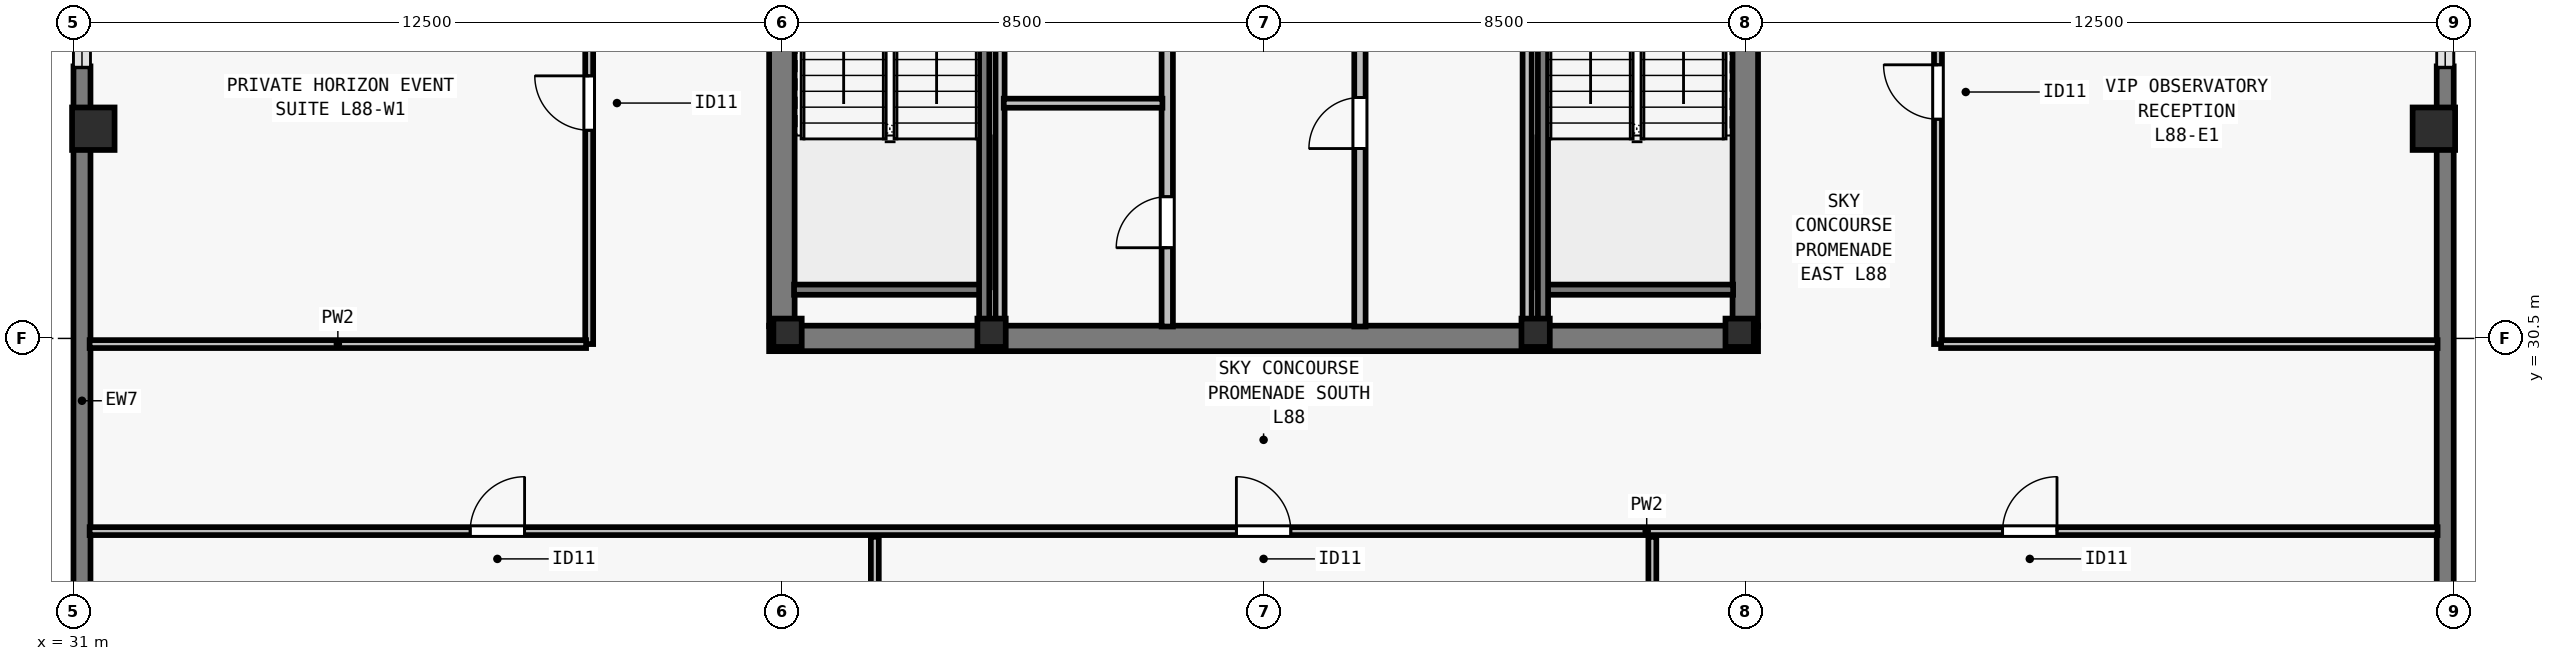
"""IFC4 building model, lengths in metres.
Left out: names, types, materials, properties, quantities, classifications, styles, units other than length and angle.
Written with IfcOpenShell. Run it as: python <this file> out.ifc"""

import sys

from ifc_helpers import new_model, si_unit, direction, frame, frame_2d, origin, origin_2d, place, context, subcontext, project, spatial, rectangle, i_section, extrude, element, fill, save


model = new_model("IFC4")
c1 = context("Model", 3, precision=1e-05, world=origin(), true_north=direction((0.0, 1.0)))
c2 = subcontext(c1, "Body", "Model", "MODEL_VIEW")
j1 = project(units=[si_unit("LENGTHUNIT", "METRE"), si_unit("PLANEANGLEUNIT", "RADIAN")], contexts=[c1])
p1 = place(None, origin())
s1 = spatial("IfcSite", under=j1, at=p1, CompositionType="ELEMENT")
p2 = place(p1, origin())
s2 = spatial("IfcBuilding", under=s1, at=p2, CompositionType="ELEMENT")
p3 = place(p2, frame((0.0, 0.0, 320.0)))
s3 = spatial("IfcBuildingStorey", under=s2, at=p3, CompositionType="ELEMENT", Elevation=320.0)
for number, where, z_axis, x_axis in (
    (1, (43.6, 30.6, 0.0), (0.0, 0.0, 1.0), (1.0, 0.0, 0.0)),
    (2, (47.2, 30.6, 0.0), (0.0, 0.0, 1.0), (1.0, 0.0, 0.0)),
    (3, (56.8, 30.6, 0.0), (0.0, 0.0, 1.0), (1.0, 0.0, 0.0)),
    (4, (60.4, 30.6, 0.0), (0.0, 0.0, 1.0), (1.0, 0.0, 0.0)),
):
    element("IfcColumn", number, at=place(p3, frame(where, z_axis=z_axis, x_axis=x_axis)), inside=s3, PredefinedType="COLUMN", context=c2, shape_type="SweptSolid", body=[
        extrude(i_section(OverallWidth=0.5, OverallDepth=0.5, WebThickness=0.028, FlangeThickness=0.045, at=origin_2d()), origin(), (0.0, 0.0, 1.0), 4.5),
    ])
for number, where, z_axis, x_axis in (
    (5, (72.65, 34.2, 0.0), (0.0, 0.0, 1.0), (0.0, 1.0, 0.0)),
    (6, (31.35, 34.2, 0.0), (0.0, 0.0, 1.0), (0.0, 1.0, 0.0)),
):
    element("IfcColumn", number, at=place(p3, frame(where, z_axis=z_axis, x_axis=x_axis)), inside=s3, PredefinedType="COLUMN", context=c2, shape_type="SweptSolid", body=[
        extrude(rectangle(XDim=0.75, YDim=0.75, at=origin_2d()), origin(), (0.0, 0.0, 1.0), 4.5),
    ])
p4 = place(p3, frame((72.85, 35.3, 0.0), z_axis=(0.0, 0.0, 1.0), x_axis=(0.0, -1.0, 0.0)))
e7 = element("IfcWall", 7, at=p4, inside=s3, PredefinedType="SOLIDWALL", context=c2, shape_type="SweptSolid", body=[
    extrude(rectangle(XDim=11.522, YDim=0.3, at=frame_2d((5.761, 0.0))), origin(), (0.0, 0.0, 1.0), 4.25),
])
p5 = place(p3, frame((31.15, 23.5, 0.0), z_axis=(0.0, 0.0, 1.0), x_axis=(0.0, 1.0, 0.0)))
e8 = element("IfcWall", 8, at=p5, inside=s3, PredefinedType="SOLIDWALL", context=c2, shape_type="SweptSolid", body=[
    extrude(rectangle(XDim=11.8, YDim=0.3, at=frame_2d((5.9, 0.0))), origin(), (0.0, 0.0, 1.0), 4.25),
])
p6 = place(p3, frame((43.275, 30.5, 0.0), z_axis=(0.0, 0.0, 1.0), x_axis=(1.0, 0.0, 0.0)))
e9 = element("IfcWall", 9, at=p6, inside=s3, PredefinedType="SHEAR", context=c2, shape_type="SweptSolid", body=[
    extrude(rectangle(XDim=17.45, YDim=0.45, at=frame_2d((8.725, 0.0))), origin(), (0.0, 0.0, 1.0), 4.25),
])
for number, where, z_axis, x_axis in (
    (10, (43.5, 30.715, 0.0), (0.0, 0.0, 1.0), (0.0, 1.0, 0.0)),
    (11, (60.5, 30.715, 0.0), (0.0, 0.0, 1.0), (0.0, 1.0, 0.0)),
):
    element("IfcWall", number, at=place(p3, frame(where, z_axis=z_axis, x_axis=x_axis)), inside=s3, PredefinedType="SHEAR", context=c2, shape_type="SweptSolid", body=[
        extrude(rectangle(XDim=8.035, YDim=0.45, at=frame_2d((4.018, 0.0))), origin(), (0.0, 0.0, 1.0), 4.25),
    ])
p7 = place(p3, frame((50.3, 30.71, 0.0), z_axis=(0.0, 0.0, 1.0), x_axis=(0.0, 1.0, 0.0)))
e12 = element("IfcWall", 12, at=p7, inside=s3, PredefinedType="SOLIDWALL", context=c2, shape_type="SweptSolid", body=[
    extrude(rectangle(XDim=7.905, YDim=0.2, at=frame_2d((3.953, 0.0))), origin(), (0.0, 0.0, 1.0), 4.25),
])
p8 = place(p7, frame((1.39, 0.0, 0.0)))
e13 = element("IfcOpeningElement", 13, at=p8, cuts=e12, PredefinedType="OPENING", context=c2, shape_type="SweptSolid", body=[
    extrude(rectangle(XDim=0.9, YDim=2.12, at=frame_2d((0.45, 1.06))), frame((0.0, 0.11, 0.0), z_axis=(0.0, -1.0, 0.0), x_axis=(1.0, 0.0, 0.0)), (0.0, 0.0, 1.0), 0.22),
])
p9 = place(p7, frame((5.39, 0.0, 0.0)))
e14 = element("IfcOpeningElement", 14, at=p9, cuts=e12, PredefinedType="OPENING", context=c2, shape_type="SweptSolid", body=[
    extrude(rectangle(XDim=0.9, YDim=2.12, at=frame_2d((0.45, 1.06))), frame((0.0, 0.11, 0.0), z_axis=(0.0, -1.0, 0.0), x_axis=(1.0, 0.0, 0.0)), (0.0, 0.0, 1.0), 0.22),
])
p10 = place(p3, frame((53.7, 30.71, 0.0), z_axis=(0.0, 0.0, 1.0), x_axis=(0.0, 1.0, 0.0)))
e15 = element("IfcWall", 15, at=p10, inside=s3, PredefinedType="SOLIDWALL", context=c2, shape_type="SweptSolid", body=[
    extrude(rectangle(XDim=7.905, YDim=0.2, at=frame_2d((3.953, 0.0))), origin(), (0.0, 0.0, 1.0), 4.25),
])
p11 = place(p10, frame((3.14, 0.0, 0.0)))
e16 = element("IfcOpeningElement", 16, at=p11, cuts=e15, PredefinedType="OPENING", context=c2, shape_type="SweptSolid", body=[
    extrude(rectangle(XDim=0.9, YDim=2.12, at=frame_2d((0.45, 1.06))), frame((0.0, 0.11, 0.0), z_axis=(0.0, -1.0, 0.0), x_axis=(1.0, 0.0, 0.0)), (0.0, 0.0, 1.0), 0.22),
])
p12 = place(p3, frame((47.35, 30.71, 0.0), z_axis=(0.0, 0.0, 1.0), x_axis=(0.0, 1.0, 0.0)))
e17 = element("IfcWall", 17, at=p12, inside=s3, PredefinedType="PARTITIONING", context=c2, shape_type="SweptSolid", body=[
    extrude(rectangle(XDim=7.905, YDim=0.16, at=frame_2d((3.953, 0.0))), origin(), (0.0, 0.0, 1.0), 4.25),
])
p13 = place(p3, frame((47.415, 34.65, 0.0), z_axis=(0.0, 0.0, 1.0), x_axis=(1.0, 0.0, 0.0)))
e18 = element("IfcWall", 18, at=p13, inside=s3, PredefinedType="PARTITIONING", context=c2, shape_type="SweptSolid", body=[
    extrude(rectangle(XDim=2.8, YDim=0.16, at=frame_2d((1.4, 0.0))), origin(), (0.0, 0.0, 1.0), 4.25),
])
p14 = place(p3, frame((56.65, 30.71, 0.0), z_axis=(0.0, 0.0, 1.0), x_axis=(0.0, 1.0, 0.0)))
e19 = element("IfcWall", 19, at=p14, inside=s3, PredefinedType="PARTITIONING", context=c2, shape_type="SweptSolid", body=[
    extrude(rectangle(XDim=7.905, YDim=0.16, at=frame_2d((3.953, 0.0))), origin(), (0.0, 0.0, 1.0), 4.25),
])
p15 = place(p3, frame((31.285, 27.1, 0.0), z_axis=(0.0, 0.0, 1.0), x_axis=(1.0, 0.0, 0.0)))
e20 = element("IfcWall", 20, at=p15, inside=s3, PredefinedType="PARTITIONING", context=c2, shape_type="SweptSolid", body=[
    extrude(rectangle(XDim=41.43, YDim=0.14, at=frame_2d((20.715, 0.0))), origin(), (0.0, 0.0, 1.0), 3.969),
])
p16 = place(p15, frame((6.715, 0.0, 0.0)))
e21 = element("IfcOpeningElement", 21, at=p16, cuts=e20, PredefinedType="OPENING", context=c2, shape_type="SweptSolid", body=[
    extrude(rectangle(XDim=0.96, YDim=2.12, at=frame_2d((0.48, 1.06))), frame((0.0, 0.08, 0.0), z_axis=(0.0, -1.0, 0.0), x_axis=(1.0, 0.0, 0.0)), (0.0, 0.0, 1.0), 0.16),
])
p17 = place(p15, frame((20.235, 0.0, 0.0)))
e22 = element("IfcOpeningElement", 22, at=p17, cuts=e20, PredefinedType="OPENING", context=c2, shape_type="SweptSolid", body=[
    extrude(rectangle(XDim=0.96, YDim=2.12, at=frame_2d((0.48, 1.06))), frame((0.0, 0.08, 0.0), z_axis=(0.0, -1.0, 0.0), x_axis=(1.0, 0.0, 0.0)), (0.0, 0.0, 1.0), 0.16),
])
p18 = place(p15, frame((33.755, 0.0, 0.0)))
e23 = element("IfcOpeningElement", 23, at=p18, cuts=e20, PredefinedType="OPENING", context=c2, shape_type="SweptSolid", body=[
    extrude(rectangle(XDim=0.96, YDim=2.12, at=frame_2d((0.48, 1.06))), frame((0.0, 0.08, 0.0), z_axis=(0.0, -1.0, 0.0), x_axis=(1.0, 0.0, 0.0)), (0.0, 0.0, 1.0), 0.16),
])
p19 = place(p3, frame((40.1, 30.4, 0.0), z_axis=(0.0, 0.0, 1.0), x_axis=(0.0, 1.0, 0.0)))
e24 = element("IfcWall", 24, at=p19, inside=s3, PredefinedType="PARTITIONING", context=c2, shape_type="SweptSolid", body=[
    extrude(rectangle(XDim=17.2, YDim=0.14, at=frame_2d((8.6, 0.0))), origin(), (0.0, 0.0, 1.0), 3.969),
])
p20 = place(p19, frame((3.772, 0.0, 0.0)))
e25 = element("IfcOpeningElement", 25, at=p20, cuts=e24, PredefinedType="OPENING", context=c2, shape_type="SweptSolid", body=[
    extrude(rectangle(XDim=0.96, YDim=2.12, at=frame_2d((0.48, 1.06))), frame((0.0, 0.08, 0.0), z_axis=(0.0, -1.0, 0.0), x_axis=(1.0, 0.0, 0.0)), (0.0, 0.0, 1.0), 0.16),
])
p21 = place(p19, frame((12.272, 0.0, 0.0)))
e26 = element("IfcOpeningElement", 26, at=p21, cuts=e24, PredefinedType="OPENING", context=c2, shape_type="SweptSolid", body=[
    extrude(rectangle(XDim=0.96, YDim=2.12, at=frame_2d((0.48, 1.06))), frame((0.0, 0.08, 0.0), z_axis=(0.0, -1.0, 0.0), x_axis=(1.0, 0.0, 0.0)), (0.0, 0.0, 1.0), 0.16),
])
p22 = place(p3, frame((63.9, 30.4, 0.0), z_axis=(0.0, 0.0, 1.0), x_axis=(0.0, 1.0, 0.0)))
e27 = element("IfcWall", 27, at=p22, inside=s3, PredefinedType="PARTITIONING", context=c2, shape_type="SweptSolid", body=[
    extrude(rectangle(XDim=17.2, YDim=0.14, at=frame_2d((8.6, 0.0))), origin(), (0.0, 0.0, 1.0), 4.25),
])
p23 = place(p22, frame((3.968, 0.0, 0.0)))
e28 = element("IfcOpeningElement", 28, at=p23, cuts=e27, PredefinedType="OPENING", context=c2, shape_type="SweptSolid", body=[
    extrude(rectangle(XDim=0.96, YDim=2.12, at=frame_2d((0.48, 1.06))), frame((0.0, 0.08, 0.0), z_axis=(0.0, -1.0, 0.0), x_axis=(1.0, 0.0, 0.0)), (0.0, 0.0, 1.0), 0.16),
])
p24 = place(p22, frame((12.468, 0.0, 0.0)))
e29 = element("IfcOpeningElement", 29, at=p24, cuts=e27, PredefinedType="OPENING", context=c2, shape_type="SweptSolid", body=[
    extrude(rectangle(XDim=0.96, YDim=2.12, at=frame_2d((0.48, 1.06))), frame((0.0, 0.08, 0.0), z_axis=(0.0, -1.0, 0.0), x_axis=(1.0, 0.0, 0.0)), (0.0, 0.0, 1.0), 0.16),
])
for number, where, z_axis, x_axis in (
    (30, (31.285, 30.4, 0.0), (0.0, 0.0, 1.0), (1.0, 0.0, 0.0)),
    (31, (63.955, 30.4, 0.0), (0.0, 0.0, 1.0), (1.0, 0.0, 0.0)),
):
    element("IfcWall", number, at=place(p3, frame(where, z_axis=z_axis, x_axis=x_axis)), inside=s3, PredefinedType="PARTITIONING", context=c2, shape_type="SweptSolid", body=[
        extrude(rectangle(XDim=8.76, YDim=0.14, at=frame_2d((4.38, 0.0))), origin(), (0.0, 0.0, 1.0), 2.425),
    ])
for number, where, z_axis, x_axis in (
    (32, (45.14, 18.285, 0.0), (0.0, 0.0, 1.0), (0.0, 1.0, 0.0)),
    (33, (58.86, 18.285, 0.0), (0.0, 0.0, 1.0), (0.0, 1.0, 0.0)),
):
    element("IfcWall", number, at=place(p3, frame(where, z_axis=z_axis, x_axis=x_axis)), inside=s3, PredefinedType="PARTITIONING", context=c2, shape_type="SweptSolid", body=[
        extrude(rectangle(XDim=8.715, YDim=0.14, at=frame_2d((4.357, 0.0))), origin(), (0.0, 0.0, 1.0), 4.25),
    ])
p25 = place(p3, frame((43.715, 31.36, 0.0), z_axis=(0.0, 0.0, 1.0), x_axis=(1.0, 0.0, 0.0)))
e34 = element("IfcWall", 34, at=p25, inside=s3, PredefinedType="SOLIDWALL", context=c2, shape_type="SweptSolid", body=[
    extrude(rectangle(XDim=3.28, YDim=0.18, at=frame_2d((1.64, 0.0))), origin(), (0.0, 0.0, 1.0), 4.25),
])
p26 = place(p3, frame((47.07, 38.78, 0.0), z_axis=(0.0, 0.0, 1.0), x_axis=(0.0, -1.0, 0.0)))
e35 = element("IfcWall", 35, at=p26, inside=s3, PredefinedType="SOLIDWALL", context=c2, shape_type="SweptSolid", body=[
    extrude(rectangle(XDim=8.067, YDim=0.18, at=frame_2d((4.034, 0.0))), origin(), (0.0, 0.0, 1.0), 4.25),
])
p27 = place(p3, frame((57.005, 31.36, 0.0), z_axis=(0.0, 0.0, 1.0), x_axis=(1.0, 0.0, 0.0)))
e36 = element("IfcWall", 36, at=p27, inside=s3, PredefinedType="SOLIDWALL", context=c2, shape_type="SweptSolid", body=[
    extrude(rectangle(XDim=3.28, YDim=0.18, at=frame_2d((1.64, 0.0))), origin(), (0.0, 0.0, 1.0), 4.25),
])
p28 = place(p3, frame((56.93, 38.78, 0.0), z_axis=(0.0, 0.0, 1.0), x_axis=(0.0, -1.0, 0.0)))
e37 = element("IfcWall", 37, at=p28, inside=s3, PredefinedType="SOLIDWALL", context=c2, shape_type="SweptSolid", body=[
    extrude(rectangle(XDim=8.067, YDim=0.18, at=frame_2d((4.034, 0.0))), origin(), (0.0, 0.0, 1.0), 4.25),
])
p29 = place(p8, origin())
e38 = element("IfcDoor", 38, at=p29, inside=s3, OperationType="SINGLE_SWING_LEFT", PredefinedType="DOOR", context=c2, shape_type="SweptSolid", body=[
    extrude(rectangle(XDim=0.9, YDim=2.12, at=frame_2d((0.45, 1.06))), frame((0.0, 0.025, 0.0), z_axis=(0.0, -1.0, 0.0), x_axis=(1.0, 0.0, 0.0)), (0.0, 0.0, 1.0), 0.05),
])
fill(e13, e38)
p30 = place(p11, origin())
e39 = element("IfcDoor", 39, at=p30, inside=s3, OperationType="SINGLE_SWING_LEFT", PredefinedType="DOOR", context=c2, shape_type="SweptSolid", body=[
    extrude(rectangle(XDim=0.9, YDim=2.12, at=frame_2d((0.45, 1.06))), frame((0.0, 0.025, 0.0), z_axis=(0.0, -1.0, 0.0), x_axis=(1.0, 0.0, 0.0)), (0.0, 0.0, 1.0), 0.05),
])
fill(e16, e39)
p31 = place(p16, origin())
e40 = element("IfcDoor", 40, at=p31, inside=s3, OperationType="SINGLE_SWING_RIGHT", PredefinedType="DOOR", context=c2, shape_type="SweptSolid", body=[
    extrude(rectangle(XDim=0.96, YDim=2.12, at=frame_2d((0.48, 1.06))), frame((0.0, 0.025, 0.0), z_axis=(0.0, -1.0, 0.0), x_axis=(1.0, 0.0, 0.0)), (0.0, 0.0, 1.0), 0.05),
])
fill(e21, e40)
p32 = place(p17, origin())
e41 = element("IfcDoor", 41, at=p32, inside=s3, OperationType="SINGLE_SWING_LEFT", PredefinedType="DOOR", context=c2, shape_type="SweptSolid", body=[
    extrude(rectangle(XDim=0.96, YDim=2.12, at=frame_2d((0.48, 1.06))), frame((0.0, 0.025, 0.0), z_axis=(0.0, -1.0, 0.0), x_axis=(1.0, 0.0, 0.0)), (0.0, 0.0, 1.0), 0.05),
])
fill(e22, e41)
p33 = place(p18, origin())
e42 = element("IfcDoor", 42, at=p33, inside=s3, OperationType="SINGLE_SWING_RIGHT", PredefinedType="DOOR", context=c2, shape_type="SweptSolid", body=[
    extrude(rectangle(XDim=0.96, YDim=2.12, at=frame_2d((0.48, 1.06))), frame((0.0, 0.025, 0.0), z_axis=(0.0, -1.0, 0.0), x_axis=(1.0, 0.0, 0.0)), (0.0, 0.0, 1.0), 0.05),
])
fill(e23, e42)
p34 = place(p20, origin())
e43 = element("IfcDoor", 43, at=p34, inside=s3, OperationType="SINGLE_SWING_RIGHT", PredefinedType="DOOR", context=c2, shape_type="SweptSolid", body=[
    extrude(rectangle(XDim=0.96, YDim=2.12, at=frame_2d((0.48, 1.06))), frame((0.0, 0.025, 0.0), z_axis=(0.0, -1.0, 0.0), x_axis=(1.0, 0.0, 0.0)), (0.0, 0.0, 1.0), 0.05),
])
fill(e25, e43)
p35 = place(p23, origin())
e44 = element("IfcDoor", 44, at=p35, inside=s3, OperationType="SINGLE_SWING_RIGHT", PredefinedType="DOOR", context=c2, shape_type="SweptSolid", body=[
    extrude(rectangle(XDim=0.96, YDim=2.12, at=frame_2d((0.48, 1.06))), frame((0.0, 0.025, 0.0), z_axis=(0.0, -1.0, 0.0), x_axis=(1.0, 0.0, 0.0)), (0.0, 0.0, 1.0), 0.05),
])
fill(e28, e44)
save(model, sys.argv[1])
